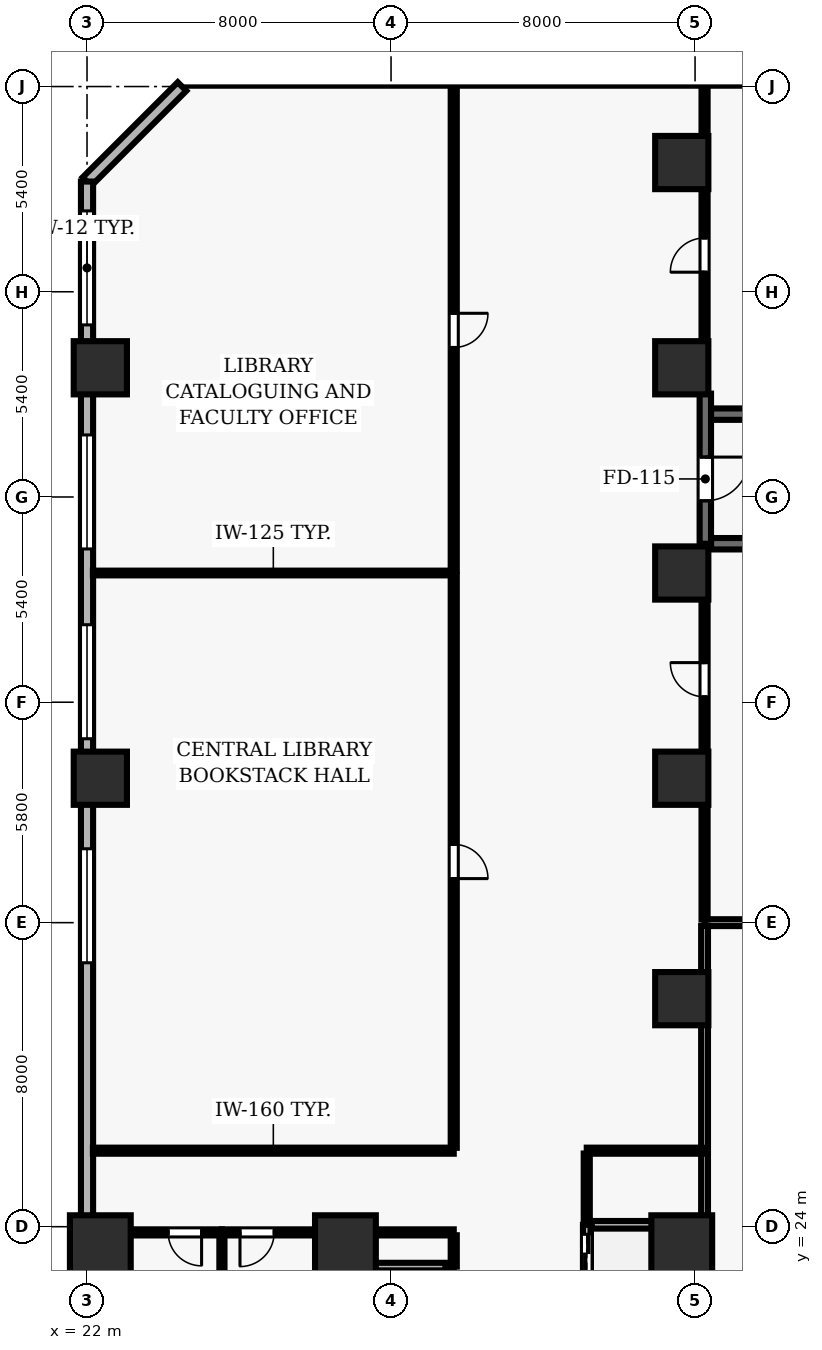
"""IFC4 building model, lengths in metres.
Left out: names, types, materials, properties, quantities, classifications, styles, units other than length and angle.
Written with IfcOpenShell. Run it as: python <this file> out.ifc"""

import sys

from ifc_helpers import new_model, si_unit, direction, frame, frame_2d, origin, origin_2d, place, context, subcontext, project, spatial, rectangle, extrude, element, fill, save


model = new_model("IFC4")
c1 = context("Model", 3, precision=1e-05, world=origin(), true_north=direction((0.0, 1.0)))
c2 = subcontext(c1, "Body", "Model", "MODEL_VIEW")
j1 = project(units=[si_unit("LENGTHUNIT", "METRE"), si_unit("PLANEANGLEUNIT", "RADIAN")], contexts=[c1])
p1 = place(None, origin())
s1 = spatial("IfcSite", under=j1, at=p1, CompositionType="ELEMENT")
p2 = place(p1, origin())
s2 = spatial("IfcBuilding", under=s1, at=p2, CompositionType="ELEMENT")
p3 = place(p2, frame((0.0, 0.0, 10.4)))
s3 = spatial("IfcBuildingStorey", under=s2, at=p3, CompositionType="ELEMENT", Elevation=10.4)
for number, where, z_axis, x_axis in (
    (1, (22.35, 23.5, 0.0), (0.0, 0.0, 1.0), (1.0, 0.0, 0.0)),
    (2, (28.8, 23.5, 0.0), (0.0, 0.0, 1.0), (1.0, 0.0, 0.0)),
    (3, (37.65, 23.5, 0.0), (0.0, 0.0, 1.0), (1.0, 0.0, 0.0)),
):
    element("IfcColumn", number, at=place(p3, frame(where, z_axis=z_axis, x_axis=x_axis)), inside=s3, PredefinedType="COLUMN", context=c2, shape_type="SweptSolid", body=[
        extrude(rectangle(XDim=1.6, YDim=1.6, at=origin_2d()), origin(), (0.0, 0.0, 1.0), 5.2),
    ])
for number, where, z_axis, x_axis in (
    (4, (37.65, 30.0, 0.0), (0.0, 0.0, 1.0), (1.0, 0.0, 0.0)),
    (5, (22.35, 35.8, 0.0), (0.0, 0.0, 1.0), (1.0, 0.0, 0.0)),
    (6, (37.65, 35.8, 0.0), (0.0, 0.0, 1.0), (1.0, 0.0, 0.0)),
    (7, (37.65, 41.2, 0.0), (0.0, 0.0, 1.0), (1.0, 0.0, 0.0)),
    (8, (22.35, 46.6, 0.0), (0.0, 0.0, 1.0), (1.0, 0.0, 0.0)),
    (9, (37.65, 46.6, 0.0), (0.0, 0.0, 1.0), (1.0, 0.0, 0.0)),
    (10, (37.65, 52.0, 0.0), (0.0, 0.0, 1.0), (1.0, 0.0, 0.0)),
):
    element("IfcColumn", number, at=place(p3, frame(where, z_axis=z_axis, x_axis=x_axis)), inside=s3, PredefinedType="COLUMN", context=c2, shape_type="SweptSolid", body=[
        extrude(rectangle(XDim=1.4, YDim=1.4, at=origin_2d()), origin(), (0.0, 0.0, 1.0), 5.2),
    ])
p4 = place(p3, frame((24.5, 54.0, 0.0), z_axis=(0.0, 0.0, 1.0), x_axis=(-0.707106781187, -0.707106781187, 0.0)))
e11 = element("IfcWall", 11, at=p4, inside=s3, PredefinedType="SOLIDWALL", context=c2, shape_type="SweptSolid", body=[
    extrude(rectangle(XDim=3.536, YDim=0.32, at=frame_2d((1.768, 0.0))), origin(), (0.0, 0.0, 1.0), 4.92),
])
p5 = place(p3, frame((22.0, 51.5, 0.0), z_axis=(0.0, 0.0, 1.0), x_axis=(0.0, -1.0, 0.0)))
e12 = element("IfcWall", 12, at=p5, inside=s3, PredefinedType="SOLIDWALL", context=c2, shape_type="SweptSolid", body=[
    extrude(rectangle(XDim=49.0, YDim=0.32, at=frame_2d((24.5, 0.0))), origin(), (0.0, 0.0, 1.0), 4.92),
])
p6 = place(p5, frame((0.772, 0.0, 0.9)))
e13 = element("IfcOpeningElement", 13, at=p6, cuts=e12, PredefinedType="OPENING", context=c2, shape_type="SweptSolid", body=[
    extrude(rectangle(XDim=3.0, YDim=2.2, at=frame_2d((1.5, 1.1))), frame((0.0, 0.17, 0.0), z_axis=(0.0, -1.0, 0.0), x_axis=(1.0, 0.0, 0.0)), (0.0, 0.0, 1.0), 0.34),
])
p7 = place(p5, frame((6.667, 0.0, 0.9)))
e14 = element("IfcOpeningElement", 14, at=p7, cuts=e12, PredefinedType="OPENING", context=c2, shape_type="SweptSolid", body=[
    extrude(rectangle(XDim=3.0, YDim=2.2, at=frame_2d((1.5, 1.1))), frame((0.0, 0.17, 0.0), z_axis=(0.0, -1.0, 0.0), x_axis=(1.0, 0.0, 0.0)), (0.0, 0.0, 1.0), 0.34),
])
p8 = place(p5, frame((11.661, 0.0, 0.9)))
e15 = element("IfcOpeningElement", 15, at=p8, cuts=e12, PredefinedType="OPENING", context=c2, shape_type="SweptSolid", body=[
    extrude(rectangle(XDim=3.0, YDim=2.2, at=frame_2d((1.5, 1.1))), frame((0.0, 0.17, 0.0), z_axis=(0.0, -1.0, 0.0), x_axis=(1.0, 0.0, 0.0)), (0.0, 0.0, 1.0), 0.34),
])
p9 = place(p5, frame((17.556, 0.0, 0.9)))
e16 = element("IfcOpeningElement", 16, at=p9, cuts=e12, PredefinedType="OPENING", context=c2, shape_type="SweptSolid", body=[
    extrude(rectangle(XDim=3.0, YDim=2.2, at=frame_2d((1.5, 1.1))), frame((0.0, 0.17, 0.0), z_axis=(0.0, -1.0, 0.0), x_axis=(1.0, 0.0, 0.0)), (0.0, 0.0, 1.0), 0.34),
])
p10 = place(p5, frame((39.333, 0.0, 0.9)))
e17 = element("IfcOpeningElement", 17, at=p10, cuts=e12, PredefinedType="OPENING", context=c2, shape_type="SweptSolid", body=[
    extrude(rectangle(XDim=3.0, YDim=2.2, at=frame_2d((1.5, 1.1))), frame((0.0, 0.17, 0.0), z_axis=(0.0, -1.0, 0.0), x_axis=(1.0, 0.0, 0.0)), (0.0, 0.0, 1.0), 0.34),
])
for number, where, z_axis, x_axis in (
    (18, (38.42, 41.97, 0.0), (0.0, 0.0, 1.0), (1.0, 0.0, 0.0)),
    (19, (46.38, 45.38, 0.0), (0.0, 0.0, 1.0), (-1.0, 0.0, 0.0)),
):
    element("IfcWall", number, at=place(p3, frame(where, z_axis=z_axis, x_axis=x_axis)), inside=s3, PredefinedType="SHEAR", context=c2, shape_type="SweptSolid", body=[
        extrude(rectangle(XDim=7.96, YDim=0.3, at=frame_2d((3.98, 0.0))), origin(), (0.0, 0.0, 1.0), 4.92),
    ])
p11 = place(p3, frame((38.27, 45.92, 0.0), z_axis=(0.0, 0.0, 1.0), x_axis=(0.0, -1.0, 0.0)))
e20 = element("IfcWall", 20, at=p11, inside=s3, PredefinedType="SHEAR", context=c2, shape_type="SweptSolid", body=[
    extrude(rectangle(XDim=3.95, YDim=0.3, at=frame_2d((1.975, 0.0))), origin(), (0.0, 0.0, 1.0), 4.92),
])
p12 = place(p11, frame((1.67, 0.0, 0.0)))
e21 = element("IfcOpeningElement", 21, at=p12, cuts=e20, PredefinedType="OPENING", context=c2, shape_type="SweptSolid", body=[
    extrude(rectangle(XDim=1.15, YDim=2.15, at=frame_2d((0.575, 1.075))), frame((0.0, 0.16, 0.0), z_axis=(0.0, -1.0, 0.0), x_axis=(1.0, 0.0, 0.0)), (0.0, 0.0, 1.0), 0.32),
])
p13 = place(p3, frame((35.15, 24.05, 0.0), z_axis=(0.0, 0.0, 1.0), x_axis=(0.0, -1.0, 0.0)))
e22 = element("IfcWall", 22, at=p13, inside=s3, PredefinedType="SOLIDWALL", context=c2, shape_type="SweptSolid", body=[
    extrude(rectangle(XDim=1.5, YDim=0.2, at=frame_2d((0.75, 0.0))), origin(), (0.0, 0.0, 1.0), 4.92),
])
p14 = place(p13, frame((0.25, 0.0, 0.0)))
e23 = element("IfcOpeningElement", 23, at=p14, cuts=e22, PredefinedType="OPENING", context=c2, shape_type="SweptSolid", body=[
    extrude(rectangle(XDim=1.0, YDim=2.1, at=frame_2d((0.5, 1.05))), frame((0.0, 0.11, 0.0), z_axis=(0.0, -1.0, 0.0), x_axis=(1.0, 0.0, 0.0)), (0.0, 0.0, 1.0), 0.22),
])
p15 = place(p3, frame((37.75, 22.55, 0.0), z_axis=(0.0, 0.0, 1.0), x_axis=(0.0, 1.0, 0.0)))
e24 = element("IfcWall", 24, at=p15, inside=s3, PredefinedType="SHEAR", context=c2, shape_type="SweptSolid", body=[
    extrude(rectangle(XDim=1.5, YDim=0.6, at=frame_2d((0.75, 0.0))), origin(), (0.0, 0.0, 1.0), 4.92),
])
p16 = place(p3, frame((37.42, 24.05, 0.0), z_axis=(0.0, 0.0, 1.0), x_axis=(-1.0, 0.0, 0.0)))
e25 = element("IfcWall", 25, at=p16, inside=s3, PredefinedType="SOLIDWALL", context=c2, shape_type="SweptSolid", body=[
    extrude(rectangle(XDim=2.14, YDim=0.2, at=frame_2d((1.07, 0.0))), origin(), (0.0, 0.0, 1.0), 4.92),
])
p17 = place(p3, frame((28.85, 22.95, 0.0), z_axis=(0.0, 0.0, 1.0), x_axis=(0.0, -1.0, 0.0)))
e26 = element("IfcWall", 26, at=p17, inside=s3, PredefinedType="SOLIDWALL", context=c2, shape_type="SweptSolid", body=[
    extrude(rectangle(XDim=1.9, YDim=0.2, at=frame_2d((0.95, 0.0))), origin(), (0.0, 0.0, 1.0), 4.92),
])
p18 = place(p3, frame((31.55, 21.05, 0.0), z_axis=(0.0, 0.0, 1.0), x_axis=(0.0, 1.0, 0.0)))
e27 = element("IfcWall", 27, at=p18, inside=s3, PredefinedType="SOLIDWALL", context=c2, shape_type="SweptSolid", body=[
    extrude(rectangle(XDim=1.9, YDim=0.2, at=frame_2d((0.95, 0.0))), origin(), (0.0, 0.0, 1.0), 4.92),
])
p19 = place(p18, frame((0.45, 0.0, 0.0)))
e28 = element("IfcOpeningElement", 28, at=p19, cuts=e27, PredefinedType="OPENING", context=c2, shape_type="SweptSolid", body=[
    extrude(rectangle(XDim=1.0, YDim=2.1, at=frame_2d((0.5, 1.05))), frame((0.0, 0.11, 0.0), z_axis=(0.0, -1.0, 0.0), x_axis=(1.0, 0.0, 0.0)), (0.0, 0.0, 1.0), 0.22),
])
p20 = place(p3, frame((31.43, 22.95, 0.0), z_axis=(0.0, 0.0, 1.0), x_axis=(-1.0, 0.0, 0.0)))
e29 = element("IfcWall", 29, at=p20, inside=s3, PredefinedType="SOLIDWALL", context=c2, shape_type="SweptSolid", body=[
    extrude(rectangle(XDim=2.46, YDim=0.2, at=frame_2d((1.23, 0.0))), origin(), (0.0, 0.0, 1.0), 4.92),
])
p21 = place(p3, frame((25.55, 23.85, 0.0), z_axis=(0.0, 0.0, 1.0), x_axis=(-1.0, 0.0, 0.0)))
e30 = element("IfcWall", 30, at=p21, inside=s3, PredefinedType="PARTITIONING", context=c2, shape_type="SweptSolid", body=[
    extrude(rectangle(XDim=3.35, YDim=0.16, at=frame_2d((1.675, 0.0))), origin(), (0.0, 0.0, 1.0), 4.065),
])
p22 = place(p21, frame((0.535, 0.0, 0.0)))
e31 = element("IfcOpeningElement", 31, at=p22, cuts=e30, PredefinedType="OPENING", context=c2, shape_type="SweptSolid", body=[
    extrude(rectangle(XDim=0.88, YDim=2.1, at=frame_2d((0.44, 1.05))), frame((0.0, 0.09, 0.0), z_axis=(0.0, -1.0, 0.0), x_axis=(1.0, 0.0, 0.0)), (0.0, 0.0, 1.0), 0.18),
])
p23 = place(p3, frame((28.8, 23.85, 0.0), z_axis=(0.0, 0.0, 1.0), x_axis=(-1.0, 0.0, 0.0)))
e32 = element("IfcWall", 32, at=p23, inside=s3, PredefinedType="PARTITIONING", context=c2, shape_type="SweptSolid", body=[
    extrude(rectangle(XDim=3.25, YDim=0.16, at=frame_2d((1.625, 0.0))), origin(), (0.0, 0.0, 1.0), 4.065),
])
p24 = place(p23, frame((1.875, 0.0, 0.0)))
e33 = element("IfcOpeningElement", 33, at=p24, cuts=e32, PredefinedType="OPENING", context=c2, shape_type="SweptSolid", body=[
    extrude(rectangle(XDim=0.9, YDim=2.1, at=frame_2d((0.45, 1.05))), frame((0.0, 0.09, 0.0), z_axis=(0.0, -1.0, 0.0), x_axis=(1.0, 0.0, 0.0)), (0.0, 0.0, 1.0), 0.18),
])
p25 = place(p3, frame((28.8, 23.85, 0.0), z_axis=(0.0, 0.0, 1.0), x_axis=(1.0, 0.0, 0.0)))
e34 = element("IfcWall", 34, at=p25, inside=s3, PredefinedType="PARTITIONING", context=c2, shape_type="SweptSolid", body=[
    extrude(rectangle(XDim=2.85, YDim=0.16, at=frame_2d((1.425, 0.0))), origin(), (0.0, 0.0, 1.0), 4.92),
])
p26 = place(p3, frame((31.65, 26.0, 0.0), z_axis=(0.0, 0.0, 1.0), x_axis=(-1.0, 0.0, 0.0)))
e35 = element("IfcWall", 35, at=p26, inside=s3, PredefinedType="PARTITIONING", context=c2, shape_type="SweptSolid", body=[
    extrude(rectangle(XDim=9.495, YDim=0.16, at=frame_2d((4.748, 0.0))), origin(), (0.0, 0.0, 1.0), 4.92),
])
p27 = place(p3, frame((31.65, 41.2, 0.0), z_axis=(0.0, 0.0, 1.0), x_axis=(-1.0, 0.0, 0.0)))
e36 = element("IfcWall", 36, at=p27, inside=s3, PredefinedType="PARTITIONING", context=c2, shape_type="SweptSolid", body=[
    extrude(rectangle(XDim=9.495, YDim=0.125, at=frame_2d((4.748, 0.0))), origin(), (0.0, 0.0, 1.0), 4.92),
])
p28 = place(p3, frame((35.15, 26.0, 0.0), z_axis=(0.0, 0.0, 1.0), x_axis=(1.0, 0.0, 0.0)))
e37 = element("IfcWall", 37, at=p28, inside=s3, PredefinedType="PARTITIONING", context=c2, shape_type="SweptSolid", body=[
    extrude(rectangle(XDim=3.1, YDim=0.16, at=frame_2d((1.55, 0.0))), origin(), (0.0, 0.0, 1.0), 4.92),
])
p29 = place(p3, frame((38.25, 32.0, 0.0), z_axis=(0.0, 0.0, 1.0), x_axis=(1.0, 0.0, 0.0)))
e38 = element("IfcWall", 38, at=p29, inside=s3, PredefinedType="PARTITIONING", context=c2, shape_type="SweptSolid", body=[
    extrude(rectangle(XDim=15.66, YDim=0.18, at=frame_2d((7.83, 0.0))), origin(), (0.0, 0.0, 1.0), 4.92),
])
p30 = place(p3, frame((25.55, 19.16, 0.0), z_axis=(0.0, 0.0, 1.0), x_axis=(0.0, 1.0, 0.0)))
e39 = element("IfcWall", 39, at=p30, inside=s3, PredefinedType="PARTITIONING", context=c2, shape_type="SweptSolid", body=[
    extrude(rectangle(XDim=4.615, YDim=0.135, at=frame_2d((2.308, 0.0))), origin(), (0.0, 0.0, 1.0), 4.92),
])
p31 = place(p3, frame((28.8, 22.95, 0.0), z_axis=(0.0, 0.0, 1.0), x_axis=(0.0, 1.0, 0.0)))
e40 = element("IfcWall", 40, at=p31, inside=s3, PredefinedType="PARTITIONING", context=c2, shape_type="SweptSolid", body=[
    extrude(rectangle(XDim=0.825, YDim=0.125, at=frame_2d((0.413, 0.0))), origin(), (0.0, 0.0, 1.0), 4.92),
])
p32 = place(p3, frame((31.65, 23.775, 0.0), z_axis=(0.0, 0.0, 1.0), x_axis=(0.0, -1.0, 0.0)))
e41 = element("IfcWall", 41, at=p32, inside=s3, PredefinedType="PARTITIONING", context=c2, shape_type="SweptSolid", body=[
    extrude(rectangle(XDim=0.825, YDim=0.16, at=frame_2d((0.413, 0.0))), origin(), (0.0, 0.0, 1.0), 4.92),
])
p33 = place(p3, frame((31.65, 41.143, 0.0), z_axis=(0.0, 0.0, 1.0), x_axis=(0.0, -1.0, 0.0)))
e42 = element("IfcWall", 42, at=p33, inside=s3, PredefinedType="PARTITIONING", context=c2, shape_type="SweptSolid", body=[
    extrude(rectangle(XDim=15.068, YDim=0.16, at=frame_2d((7.534, 0.0))), origin(), (0.0, 0.0, 1.0), 4.92),
])
p34 = place(p33, frame((7.084, 0.0, 0.0)))
e43 = element("IfcOpeningElement", 43, at=p34, cuts=e42, PredefinedType="OPENING", context=c2, shape_type="SweptSolid", body=[
    extrude(rectangle(XDim=0.9, YDim=2.1, at=frame_2d((0.45, 1.05))), frame((0.0, 0.09, 0.0), z_axis=(0.0, -1.0, 0.0), x_axis=(1.0, 0.0, 0.0)), (0.0, 0.0, 1.0), 0.18),
])
p35 = place(p3, frame((31.65, 53.91, 0.0), z_axis=(0.0, 0.0, 1.0), x_axis=(0.0, -1.0, 0.0)))
e44 = element("IfcWall", 44, at=p35, inside=s3, PredefinedType="PARTITIONING", context=c2, shape_type="SweptSolid", body=[
    extrude(rectangle(XDim=12.652, YDim=0.16, at=frame_2d((6.326, 0.0))), origin(), (0.0, 0.0, 1.0), 4.92),
])
p36 = place(p35, frame((5.876, 0.0, 0.0)))
e45 = element("IfcOpeningElement", 45, at=p36, cuts=e44, PredefinedType="OPENING", context=c2, shape_type="SweptSolid", body=[
    extrude(rectangle(XDim=0.9, YDim=2.1, at=frame_2d((0.45, 1.05))), frame((0.0, 0.09, 0.0), z_axis=(0.0, -1.0, 0.0), x_axis=(1.0, 0.0, 0.0)), (0.0, 0.0, 1.0), 0.18),
])
p37 = place(p3, frame((35.15, 24.07, 0.0), z_axis=(0.0, 0.0, 1.0), x_axis=(0.0, 1.0, 0.0)))
e46 = element("IfcWall", 46, at=p37, inside=s3, PredefinedType="PARTITIONING", context=c2, shape_type="SweptSolid", body=[
    extrude(rectangle(XDim=1.855, YDim=0.16, at=frame_2d((0.927, 0.0))), origin(), (0.0, 0.0, 1.0), 4.92),
])
p38 = place(p3, frame((38.25, 25.925, 0.0), z_axis=(0.0, 0.0, 1.0), x_axis=(0.0, -1.0, 0.0)))
e47 = element("IfcWall", 47, at=p38, inside=s3, PredefinedType="PARTITIONING", context=c2, shape_type="SweptSolid", body=[
    extrude(rectangle(XDim=10.64, YDim=0.18, at=frame_2d((5.32, 0.0))), origin(), (0.0, 0.0, 1.0), 4.92),
])
p39 = place(p3, frame((38.25, 26.075, 0.0), z_axis=(0.0, 0.0, 1.0), x_axis=(0.0, 1.0, 0.0)))
e48 = element("IfcWall", 48, at=p39, inside=s3, PredefinedType="PARTITIONING", context=c2, shape_type="SweptSolid", body=[
    extrude(rectangle(XDim=5.84, YDim=0.18, at=frame_2d((2.92, 0.0))), origin(), (0.0, 0.0, 1.0), 4.92),
])
p40 = place(p3, frame((38.25, 32.085, 0.0), z_axis=(0.0, 0.0, 1.0), x_axis=(0.0, 1.0, 0.0)))
e49 = element("IfcWall", 49, at=p40, inside=s3, PredefinedType="PARTITIONING", context=c2, shape_type="SweptSolid", body=[
    extrude(rectangle(XDim=9.815, YDim=0.16, at=frame_2d((4.907, 0.0))), origin(), (0.0, 0.0, 1.0), 4.92),
])
p41 = place(p40, frame((5.857, 0.0, 0.0)))
e50 = element("IfcOpeningElement", 50, at=p41, cuts=e49, PredefinedType="OPENING", context=c2, shape_type="SweptSolid", body=[
    extrude(rectangle(XDim=0.9, YDim=2.1, at=frame_2d((0.45, 1.05))), frame((0.0, 0.09, 0.0), z_axis=(0.0, -1.0, 0.0), x_axis=(1.0, 0.0, 0.0)), (0.0, 0.0, 1.0), 0.18),
])
p42 = place(p3, frame((38.25, 45.92, 0.0), z_axis=(0.0, 0.0, 1.0), x_axis=(0.0, 1.0, 0.0)))
e51 = element("IfcWall", 51, at=p42, inside=s3, PredefinedType="PARTITIONING", context=c2, shape_type="SweptSolid", body=[
    extrude(rectangle(XDim=7.99, YDim=0.16, at=frame_2d((3.995, 0.0))), origin(), (0.0, 0.0, 1.0), 4.92),
])
p43 = place(p42, frame((3.195, 0.0, 0.0)))
e52 = element("IfcOpeningElement", 52, at=p43, cuts=e51, PredefinedType="OPENING", context=c2, shape_type="SweptSolid", body=[
    extrude(rectangle(XDim=0.9, YDim=2.1, at=frame_2d((0.45, 1.05))), frame((0.0, 0.09, 0.0), z_axis=(0.0, -1.0, 0.0), x_axis=(1.0, 0.0, 0.0)), (0.0, 0.0, 1.0), 0.18),
])
p44 = place(p6, origin())
e53 = element("IfcWindow", 53, at=p44, inside=s3, PartitioningType="SINGLE_PANEL", PredefinedType="WINDOW", context=c2, shape_type="SweptSolid", body=[
    extrude(rectangle(XDim=3.0, YDim=2.2, at=frame_2d((1.5, 1.1))), frame((0.0, 0.03, 0.0), z_axis=(0.0, -1.0, 0.0), x_axis=(1.0, 0.0, 0.0)), (0.0, 0.0, 1.0), 0.06),
])
fill(e13, e53)
p45 = place(p7, origin())
e54 = element("IfcWindow", 54, at=p45, inside=s3, PartitioningType="SINGLE_PANEL", PredefinedType="WINDOW", context=c2, shape_type="SweptSolid", body=[
    extrude(rectangle(XDim=3.0, YDim=2.2, at=frame_2d((1.5, 1.1))), frame((0.0, 0.03, 0.0), z_axis=(0.0, -1.0, 0.0), x_axis=(1.0, 0.0, 0.0)), (0.0, 0.0, 1.0), 0.06),
])
fill(e14, e54)
p46 = place(p8, origin())
e55 = element("IfcWindow", 55, at=p46, inside=s3, PartitioningType="SINGLE_PANEL", PredefinedType="WINDOW", context=c2, shape_type="SweptSolid", body=[
    extrude(rectangle(XDim=3.0, YDim=2.2, at=frame_2d((1.5, 1.1))), frame((0.0, 0.03, 0.0), z_axis=(0.0, -1.0, 0.0), x_axis=(1.0, 0.0, 0.0)), (0.0, 0.0, 1.0), 0.06),
])
fill(e15, e55)
p47 = place(p9, origin())
e56 = element("IfcWindow", 56, at=p47, inside=s3, PartitioningType="SINGLE_PANEL", PredefinedType="WINDOW", context=c2, shape_type="SweptSolid", body=[
    extrude(rectangle(XDim=3.0, YDim=2.2, at=frame_2d((1.5, 1.1))), frame((0.0, 0.03, 0.0), z_axis=(0.0, -1.0, 0.0), x_axis=(1.0, 0.0, 0.0)), (0.0, 0.0, 1.0), 0.06),
])
fill(e16, e56)
p48 = place(p12, origin())
e57 = element("IfcDoor", 57, at=p48, inside=s3, OperationType="SINGLE_SWING_LEFT", PredefinedType="DOOR", context=c2, shape_type="SweptSolid", body=[
    extrude(rectangle(XDim=1.15, YDim=2.15, at=frame_2d((0.575, 1.075))), frame((0.0, 0.025, 0.0), z_axis=(0.0, -1.0, 0.0), x_axis=(1.0, 0.0, 0.0)), (0.0, 0.0, 1.0), 0.05),
])
fill(e21, e57)
p49 = place(p14, origin())
e58 = element("IfcDoor", 58, at=p49, inside=s3, OperationType="DOUBLE_DOOR_SLIDING", PredefinedType="DOOR", context=c2, shape_type="SweptSolid", body=[
    extrude(rectangle(XDim=1.0, YDim=2.1, at=frame_2d((0.5, 1.05))), frame((0.0, 0.025, 0.0), z_axis=(0.0, -1.0, 0.0), x_axis=(1.0, 0.0, 0.0)), (0.0, 0.0, 1.0), 0.05),
])
fill(e23, e58)
p50 = place(p22, origin())
e59 = element("IfcDoor", 59, at=p50, inside=s3, OperationType="SINGLE_SWING_LEFT", PredefinedType="DOOR", context=c2, shape_type="SweptSolid", body=[
    extrude(rectangle(XDim=0.88, YDim=2.1, at=frame_2d((0.44, 1.05))), frame((0.0, 0.025, 0.0), z_axis=(0.0, -1.0, 0.0), x_axis=(1.0, 0.0, 0.0)), (0.0, 0.0, 1.0), 0.05),
])
fill(e31, e59)
p51 = place(p24, origin())
e60 = element("IfcDoor", 60, at=p51, inside=s3, OperationType="SINGLE_SWING_RIGHT", PredefinedType="DOOR", context=c2, shape_type="SweptSolid", body=[
    extrude(rectangle(XDim=0.9, YDim=2.1, at=frame_2d((0.45, 1.05))), frame((0.0, 0.025, 0.0), z_axis=(0.0, -1.0, 0.0), x_axis=(1.0, 0.0, 0.0)), (0.0, 0.0, 1.0), 0.05),
])
fill(e33, e60)
p52 = place(p34, origin())
e61 = element("IfcDoor", 61, at=p52, inside=s3, OperationType="SINGLE_SWING_RIGHT", PredefinedType="DOOR", context=c2, shape_type="SweptSolid", body=[
    extrude(rectangle(XDim=0.9, YDim=2.1, at=frame_2d((0.45, 1.05))), frame((0.0, 0.025, 0.0), z_axis=(0.0, -1.0, 0.0), x_axis=(1.0, 0.0, 0.0)), (0.0, 0.0, 1.0), 0.05),
])
fill(e43, e61)
p53 = place(p36, origin())
e62 = element("IfcDoor", 62, at=p53, inside=s3, OperationType="SINGLE_SWING_LEFT", PredefinedType="DOOR", context=c2, shape_type="SweptSolid", body=[
    extrude(rectangle(XDim=0.9, YDim=2.1, at=frame_2d((0.45, 1.05))), frame((0.0, 0.025, 0.0), z_axis=(0.0, -1.0, 0.0), x_axis=(1.0, 0.0, 0.0)), (0.0, 0.0, 1.0), 0.05),
])
fill(e45, e62)
p54 = place(p41, origin())
e63 = element("IfcDoor", 63, at=p54, inside=s3, OperationType="SINGLE_SWING_RIGHT", PredefinedType="DOOR", context=c2, shape_type="SweptSolid", body=[
    extrude(rectangle(XDim=0.9, YDim=2.1, at=frame_2d((0.45, 1.05))), frame((0.0, 0.025, 0.0), z_axis=(0.0, -1.0, 0.0), x_axis=(1.0, 0.0, 0.0)), (0.0, 0.0, 1.0), 0.05),
])
fill(e50, e63)
p55 = place(p43, origin())
e64 = element("IfcDoor", 64, at=p55, inside=s3, OperationType="SINGLE_SWING_LEFT", PredefinedType="DOOR", context=c2, shape_type="SweptSolid", body=[
    extrude(rectangle(XDim=0.9, YDim=2.1, at=frame_2d((0.45, 1.05))), frame((0.0, 0.025, 0.0), z_axis=(0.0, -1.0, 0.0), x_axis=(1.0, 0.0, 0.0)), (0.0, 0.0, 1.0), 0.05),
])
fill(e52, e64)
save(model, sys.argv[1])
